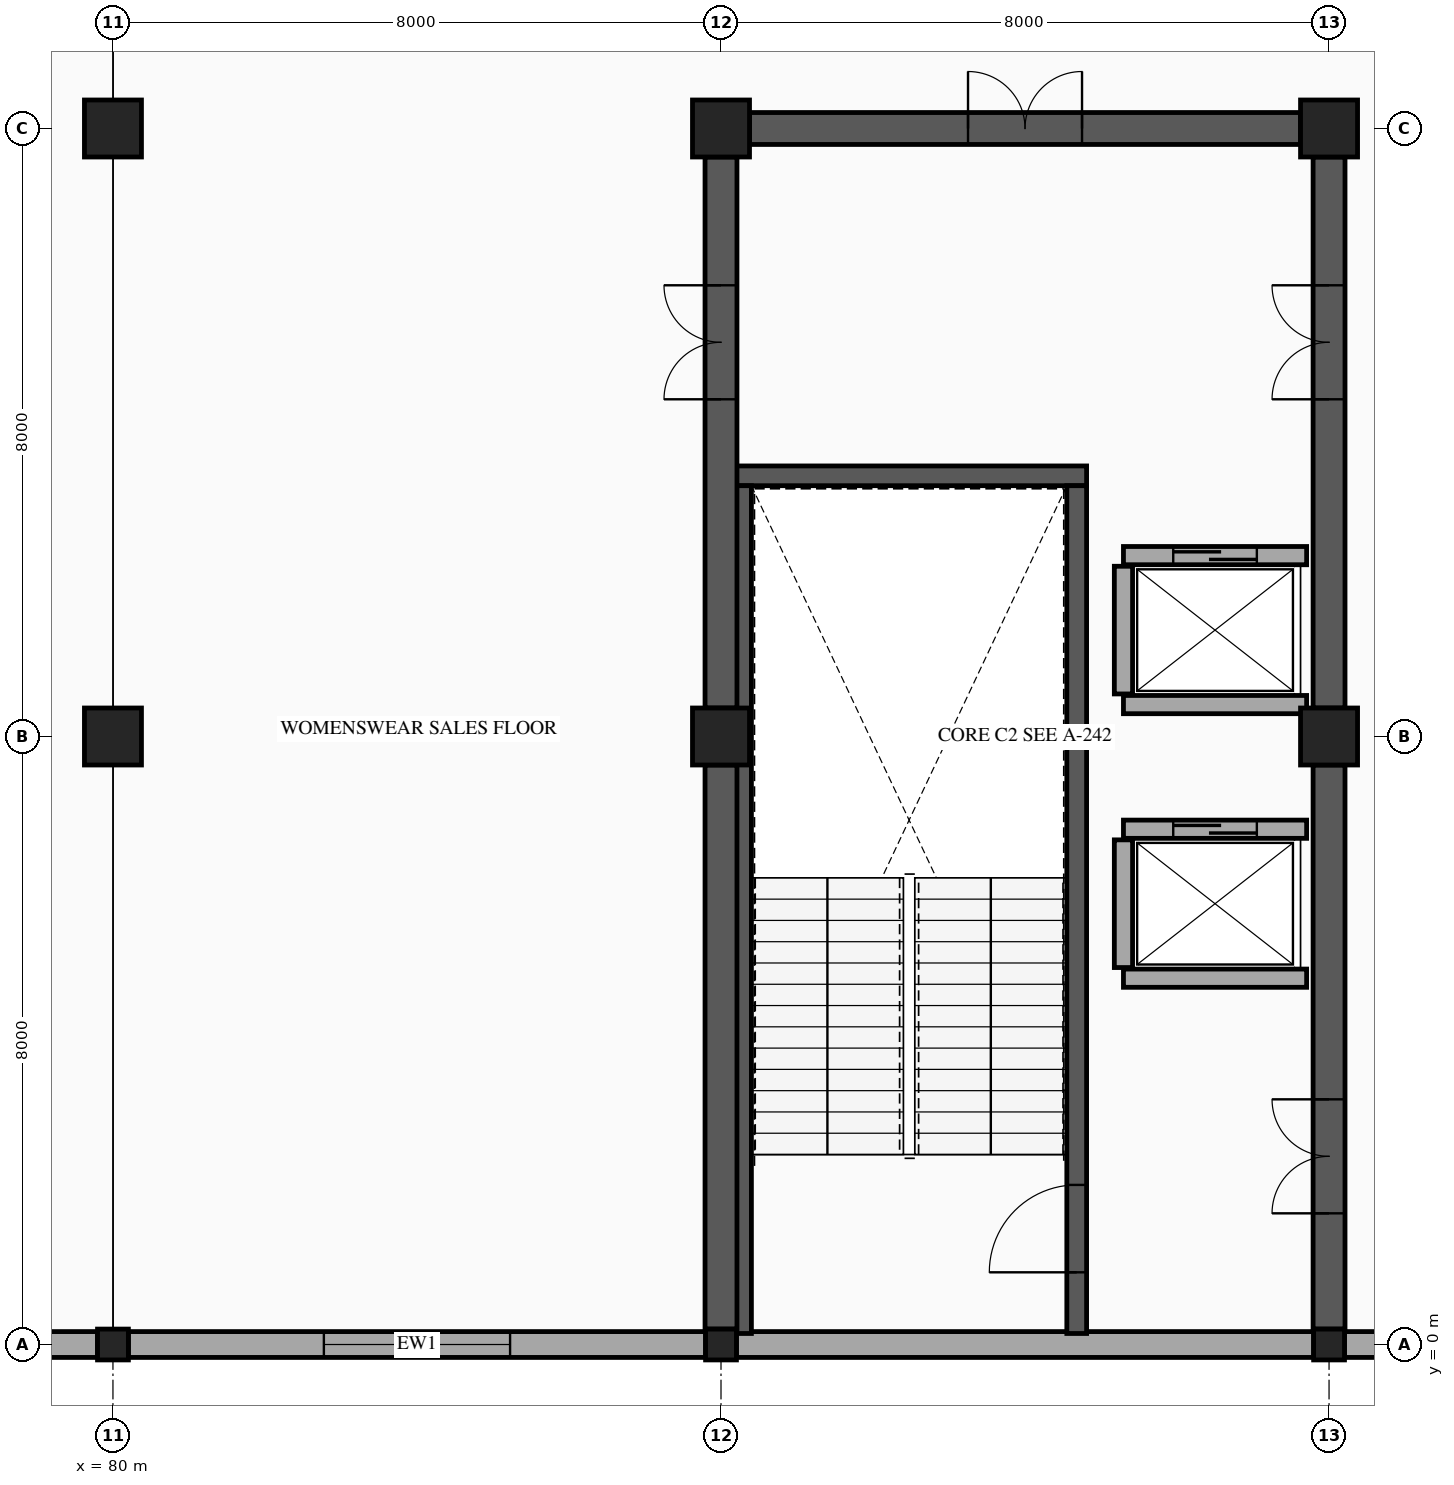
"""IFC4 building model, lengths in metres.
Left out: names, types, materials, properties, quantities, classifications, styles, units other than length and angle.
Written with IfcOpenShell. Run it as: python <this file> out.ifc"""

import sys

from ifc_helpers import new_model, si_unit, direction, frame, frame_2d, origin, origin_2d, place, context, subcontext, project, spatial, rectangle, hollow_rectangle, extrude, element, fill, save


model = new_model("IFC4")
c1 = context("Model", 3, precision=1e-05, world=origin(), true_north=direction((0.0, 1.0)))
c2 = subcontext(c1, "Body", "Model", "MODEL_VIEW")
j1 = project(units=[si_unit("LENGTHUNIT", "METRE"), si_unit("PLANEANGLEUNIT", "RADIAN")], contexts=[c1])
p1 = place(None, origin())
s1 = spatial("IfcSite", under=j1, at=p1, CompositionType="ELEMENT")
p2 = place(p1, origin())
s2 = spatial("IfcBuilding", under=s1, at=p2, CompositionType="ELEMENT")
p3 = place(p2, frame((0.0, 0.0, 5.6)))
s3 = spatial("IfcBuildingStorey", under=s2, at=p3, CompositionType="ELEMENT", Elevation=5.6)
p4 = place(p3, frame((80.0, 0.0, 0.0), z_axis=(0.0, 0.0, 1.0), x_axis=(1.0, 0.0, 0.0)))
e1 = element("IfcColumn", 1, at=p4, inside=s3, PredefinedType="COLUMN", context=c2, shape_type="SweptSolid", body=[
    extrude(hollow_rectangle(XDim=0.406, YDim=0.406, WallThickness=0.015, InnerFilletRadius=0.015, OuterFilletRadius=0.029, at=origin_2d()), origin(), (0.0, 0.0, 1.0), 4.8),
])
for number, where, z_axis, x_axis in (
    (2, (80.0, 8.0, 0.0), (0.0, 0.0, 1.0), (1.0, 0.0, 0.0)),
    (3, (80.0, 16.0, 0.0), (0.0, 0.0, 1.0), (1.0, 0.0, 0.0)),
):
    element("IfcColumn", number, at=place(p3, frame(where, z_axis=z_axis, x_axis=x_axis)), inside=s3, PredefinedType="COLUMN", context=c2, shape_type="SweptSolid", body=[
        extrude(rectangle(XDim=0.75, YDim=0.75, at=origin_2d()), origin(), (0.0, 0.0, 1.0), 4.8),
    ])
p5 = place(p3, frame((88.0, 0.0, 0.0), z_axis=(0.0, 0.0, 1.0), x_axis=(1.0, 0.0, 0.0)))
e4 = element("IfcColumn", 4, at=p5, inside=s3, PredefinedType="COLUMN", context=c2, shape_type="SweptSolid", body=[
    extrude(hollow_rectangle(XDim=0.406, YDim=0.406, WallThickness=0.015, InnerFilletRadius=0.015, OuterFilletRadius=0.029, at=origin_2d()), origin(), (0.0, 0.0, 1.0), 4.8),
])
for number, where, z_axis, x_axis in (
    (5, (88.0, 8.0, 0.0), (0.0, 0.0, 1.0), (1.0, 0.0, 0.0)),
    (6, (88.0, 16.0, 0.0), (0.0, 0.0, 1.0), (1.0, 0.0, 0.0)),
):
    element("IfcColumn", number, at=place(p3, frame(where, z_axis=z_axis, x_axis=x_axis)), inside=s3, PredefinedType="COLUMN", context=c2, shape_type="SweptSolid", body=[
        extrude(rectangle(XDim=0.75, YDim=0.75, at=origin_2d()), origin(), (0.0, 0.0, 1.0), 4.8),
    ])
p6 = place(p3, frame((96.0, 0.0, 0.0), z_axis=(0.0, 0.0, 1.0), x_axis=(1.0, 0.0, 0.0)))
e7 = element("IfcColumn", 7, at=p6, inside=s3, PredefinedType="COLUMN", context=c2, shape_type="SweptSolid", body=[
    extrude(hollow_rectangle(XDim=0.406, YDim=0.406, WallThickness=0.015, InnerFilletRadius=0.015, OuterFilletRadius=0.029, at=origin_2d()), origin(), (0.0, 0.0, 1.0), 4.8),
])
for number, where, z_axis, x_axis in (
    (8, (96.0, 8.0, 0.0), (0.0, 0.0, 1.0), (1.0, 0.0, 0.0)),
    (9, (96.0, 16.0, 0.0), (0.0, 0.0, 1.0), (1.0, 0.0, 0.0)),
):
    element("IfcColumn", number, at=place(p3, frame(where, z_axis=z_axis, x_axis=x_axis)), inside=s3, PredefinedType="COLUMN", context=c2, shape_type="SweptSolid", body=[
        extrude(rectangle(XDim=0.75, YDim=0.75, at=origin_2d()), origin(), (0.0, 0.0, 1.0), 4.8),
    ])
p7 = place(p3, frame((103.797, 0.0, 0.0), z_axis=(0.0, 0.0, 1.0), x_axis=(-1.0, 0.0, 0.0)))
e10 = element("IfcWall", 10, at=p7, inside=s3, PredefinedType="STANDARD", context=c2, shape_type="SweptSolid", body=[
    extrude(rectangle(XDim=7.594, YDim=0.34, at=frame_2d((3.797, 0.0))), origin(), (0.0, 0.0, 1.0), 3.78),
])
p8 = place(p7, frame((2.572, 0.0, 0.8)))
e11 = element("IfcOpeningElement", 11, at=p8, cuts=e10, PredefinedType="OPENING", context=c2, shape_type="SweptSolid", body=[
    extrude(rectangle(XDim=2.45, YDim=1.85, at=frame_2d((1.225, 0.925))), frame((0.0, 0.18, 0.0), z_axis=(0.0, -1.0, 0.0), x_axis=(1.0, 0.0, 0.0)), (0.0, 0.0, 1.0), 0.36),
])
p9 = place(p3, frame((95.797, 0.0, 0.0), z_axis=(0.0, 0.0, 1.0), x_axis=(-1.0, 0.0, 0.0)))
e12 = element("IfcWall", 12, at=p9, inside=s3, PredefinedType="STANDARD", context=c2, shape_type="SweptSolid", body=[
    extrude(rectangle(XDim=7.594, YDim=0.34, at=frame_2d((3.797, 0.0))), origin(), (0.0, 0.0, 1.0), 3.78),
])
p10 = place(p3, frame((87.797, 0.0, 0.0), z_axis=(0.0, 0.0, 1.0), x_axis=(-1.0, 0.0, 0.0)))
e13 = element("IfcWall", 13, at=p10, inside=s3, PredefinedType="STANDARD", context=c2, shape_type="SweptSolid", body=[
    extrude(rectangle(XDim=7.594, YDim=0.34, at=frame_2d((3.797, 0.0))), origin(), (0.0, 0.0, 1.0), 3.78),
])
p11 = place(p10, frame((2.572, 0.0, 0.8)))
e14 = element("IfcOpeningElement", 14, at=p11, cuts=e13, PredefinedType="OPENING", context=c2, shape_type="SweptSolid", body=[
    extrude(rectangle(XDim=2.45, YDim=1.85, at=frame_2d((1.225, 0.925))), frame((0.0, 0.18, 0.0), z_axis=(0.0, -1.0, 0.0), x_axis=(1.0, 0.0, 0.0)), (0.0, 0.0, 1.0), 0.36),
])
p12 = place(p3, frame((79.797, 0.0, 0.0), z_axis=(0.0, 0.0, 1.0), x_axis=(-1.0, 0.0, 0.0)))
e15 = element("IfcWall", 15, at=p12, inside=s3, PredefinedType="STANDARD", context=c2, shape_type="SweptSolid", body=[
    extrude(rectangle(XDim=7.645, YDim=0.34, at=frame_2d((3.822, 0.0))), origin(), (0.0, 0.0, 1.0), 3.78),
])
p13 = place(p12, frame((2.872, 0.0, 0.8)))
e16 = element("IfcOpeningElement", 16, at=p13, cuts=e15, PredefinedType="OPENING", context=c2, shape_type="SweptSolid", body=[
    extrude(rectangle(XDim=1.9, YDim=1.65, at=frame_2d((0.95, 0.825))), frame((0.0, 0.18, 0.0), z_axis=(0.0, -1.0, 0.0), x_axis=(1.0, 0.0, 0.0)), (0.0, 0.0, 1.0), 0.36),
])
p14 = place(p3, frame((88.14, 11.43, 0.0), z_axis=(0.0, 0.0, 1.0), x_axis=(1.0, 0.0, 0.0)))
e17 = element("IfcWall", 17, at=p14, inside=s3, PredefinedType="SHEAR", context=c2, shape_type="SweptSolid", body=[
    extrude(rectangle(XDim=4.67, YDim=0.26, at=frame_2d((2.335, 0.0))), origin(), (0.0, 0.0, 1.0), 4.58),
])
p15 = place(p3, frame((88.27, 0.145, 0.0), z_axis=(0.0, 0.0, 1.0), x_axis=(0.0, 1.0, 0.0)))
e18 = element("IfcWall", 18, at=p15, inside=s3, PredefinedType="SHEAR", context=c2, shape_type="SweptSolid", body=[
    extrude(rectangle(XDim=11.155, YDim=0.26, at=frame_2d((5.578, 0.0))), origin(), (0.0, 0.0, 1.0), 4.58),
])
p16 = place(p3, frame((92.68, 0.145, 0.0), z_axis=(0.0, 0.0, 1.0), x_axis=(0.0, 1.0, 0.0)))
e19 = element("IfcWall", 19, at=p16, inside=s3, PredefinedType="SHEAR", context=c2, shape_type="SweptSolid", body=[
    extrude(rectangle(XDim=11.155, YDim=0.26, at=frame_2d((5.578, 0.0))), origin(), (0.0, 0.0, 1.0), 4.58),
])
p17 = place(p16, frame((0.805, 0.0, 0.0)))
e20 = element("IfcOpeningElement", 20, at=p17, cuts=e19, PredefinedType="OPENING", context=c2, shape_type="SweptSolid", body=[
    extrude(rectangle(XDim=1.15, YDim=2.15, at=frame_2d((0.575, 1.075))), frame((0.0, 0.14, 0.0), z_axis=(0.0, -1.0, 0.0), x_axis=(1.0, 0.0, 0.0)), (0.0, 0.0, 1.0), 0.28),
])
p18 = place(p3, frame((88.375, 16.0, 0.0), z_axis=(0.0, 0.0, 1.0), x_axis=(1.0, 0.0, 0.0)))
e21 = element("IfcWall", 21, at=p18, inside=s3, PredefinedType="SHEAR", context=c2, shape_type="SweptSolid", body=[
    extrude(rectangle(XDim=7.25, YDim=0.42, at=frame_2d((3.625, 0.0))), origin(), (0.0, 0.0, 1.0), 4.58),
])
p19 = place(p18, frame((2.875, 0.0, 0.0)))
e22 = element("IfcOpeningElement", 22, at=p19, cuts=e21, PredefinedType="OPENING", context=c2, shape_type="SweptSolid", body=[
    extrude(rectangle(XDim=1.5, YDim=2.15, at=frame_2d((0.75, 1.075))), frame((0.0, 0.22, 0.0), z_axis=(0.0, -1.0, 0.0), x_axis=(1.0, 0.0, 0.0)), (0.0, 0.0, 1.0), 0.44),
])
p20 = place(p3, frame((88.0, 0.203, 0.0), z_axis=(0.0, 0.0, 1.0), x_axis=(0.0, 1.0, 0.0)))
e23 = element("IfcWall", 23, at=p20, inside=s3, PredefinedType="SHEAR", context=c2, shape_type="SweptSolid", body=[
    extrude(rectangle(XDim=7.422, YDim=0.42, at=frame_2d((3.711, 0.0))), origin(), (0.0, 0.0, 1.0), 4.58),
])
p21 = place(p3, frame((88.0, 8.375, 0.0), z_axis=(0.0, 0.0, 1.0), x_axis=(0.0, 1.0, 0.0)))
e24 = element("IfcWall", 24, at=p21, inside=s3, PredefinedType="SHEAR", context=c2, shape_type="SweptSolid", body=[
    extrude(rectangle(XDim=7.25, YDim=0.42, at=frame_2d((3.625, 0.0))), origin(), (0.0, 0.0, 1.0), 4.58),
])
p22 = place(p21, frame((4.062, 0.0, 0.0)))
e25 = element("IfcOpeningElement", 25, at=p22, cuts=e24, PredefinedType="OPENING", context=c2, shape_type="SweptSolid", body=[
    extrude(rectangle(XDim=1.5, YDim=2.15, at=frame_2d((0.75, 1.075))), frame((0.0, 0.22, 0.0), z_axis=(0.0, -1.0, 0.0), x_axis=(1.0, 0.0, 0.0)), (0.0, 0.0, 1.0), 0.44),
])
p23 = place(p3, frame((96.0, 0.203, 0.0), z_axis=(0.0, 0.0, 1.0), x_axis=(0.0, 1.0, 0.0)))
e26 = element("IfcWall", 26, at=p23, inside=s3, PredefinedType="SHEAR", context=c2, shape_type="SweptSolid", body=[
    extrude(rectangle(XDim=7.422, YDim=0.42, at=frame_2d((3.711, 0.0))), origin(), (0.0, 0.0, 1.0), 4.58),
])
p24 = place(p23, frame((1.523, 0.0, 0.0)))
e27 = element("IfcOpeningElement", 27, at=p24, cuts=e26, PredefinedType="OPENING", context=c2, shape_type="SweptSolid", body=[
    extrude(rectangle(XDim=1.5, YDim=2.15, at=frame_2d((0.75, 1.075))), frame((0.0, 0.22, 0.0), z_axis=(0.0, -1.0, 0.0), x_axis=(1.0, 0.0, 0.0)), (0.0, 0.0, 1.0), 0.44),
])
p25 = place(p3, frame((96.0, 8.375, 0.0), z_axis=(0.0, 0.0, 1.0), x_axis=(0.0, 1.0, 0.0)))
e28 = element("IfcWall", 28, at=p25, inside=s3, PredefinedType="SHEAR", context=c2, shape_type="SweptSolid", body=[
    extrude(rectangle(XDim=7.25, YDim=0.42, at=frame_2d((3.625, 0.0))), origin(), (0.0, 0.0, 1.0), 4.58),
])
p26 = place(p25, frame((4.062, 0.0, 0.0)))
e29 = element("IfcOpeningElement", 29, at=p26, cuts=e28, PredefinedType="OPENING", context=c2, shape_type="SweptSolid", body=[
    extrude(rectangle(XDim=1.5, YDim=2.15, at=frame_2d((0.75, 1.075))), frame((0.0, 0.22, 0.0), z_axis=(0.0, -1.0, 0.0), x_axis=(1.0, 0.0, 0.0)), (0.0, 0.0, 1.0), 0.44),
])
p27 = place(p3, frame((93.295, 6.78, 0.0), z_axis=(0.0, 0.0, 1.0), x_axis=(1.0, 0.0, 0.0)))
e30 = element("IfcWall", 30, at=p27, inside=s3, PredefinedType="PARTITIONING", context=c2, shape_type="SweptSolid", body=[
    extrude(rectangle(XDim=2.41, YDim=0.24, at=frame_2d((1.205, 0.0))), origin(), (0.0, 0.0, 1.0), 4.58),
])
p28 = place(p27, frame((0.655, 0.0, 0.0)))
e31 = element("IfcOpeningElement", 31, at=p28, cuts=e30, PredefinedType="OPENING", context=c2, shape_type="SweptSolid", body=[
    extrude(rectangle(XDim=1.1, YDim=2.15, at=frame_2d((0.55, 1.075))), frame((0.0, 0.13, 0.0), z_axis=(0.0, -1.0, 0.0), x_axis=(1.0, 0.0, 0.0)), (0.0, 0.0, 1.0), 0.26),
])
p29 = place(p3, frame((93.295, 4.82, 0.0), z_axis=(0.0, 0.0, 1.0), x_axis=(1.0, 0.0, 0.0)))
e32 = element("IfcWall", 32, at=p29, inside=s3, PredefinedType="PARTITIONING", context=c2, shape_type="SweptSolid", body=[
    extrude(rectangle(XDim=2.41, YDim=0.24, at=frame_2d((1.205, 0.0))), origin(), (0.0, 0.0, 1.0), 4.58),
])
p30 = place(p3, frame((93.295, 4.96, 0.0), z_axis=(0.0, 0.0, 1.0), x_axis=(0.0, 1.0, 0.0)))
e33 = element("IfcWall", 33, at=p30, inside=s3, PredefinedType="PARTITIONING", context=c2, shape_type="SweptSolid", body=[
    extrude(rectangle(XDim=1.68, YDim=0.24, at=frame_2d((0.84, 0.0))), origin(), (0.0, 0.0, 1.0), 4.58),
])
p31 = place(p3, frame((93.295, 10.38, 0.0), z_axis=(0.0, 0.0, 1.0), x_axis=(1.0, 0.0, 0.0)))
e34 = element("IfcWall", 34, at=p31, inside=s3, PredefinedType="PARTITIONING", context=c2, shape_type="SweptSolid", body=[
    extrude(rectangle(XDim=2.41, YDim=0.24, at=frame_2d((1.205, 0.0))), origin(), (0.0, 0.0, 1.0), 4.58),
])
p32 = place(p31, frame((0.655, 0.0, 0.0)))
e35 = element("IfcOpeningElement", 35, at=p32, cuts=e34, PredefinedType="OPENING", context=c2, shape_type="SweptSolid", body=[
    extrude(rectangle(XDim=1.1, YDim=2.15, at=frame_2d((0.55, 1.075))), frame((0.0, 0.13, 0.0), z_axis=(0.0, -1.0, 0.0), x_axis=(1.0, 0.0, 0.0)), (0.0, 0.0, 1.0), 0.26),
])
p33 = place(p3, frame((93.295, 8.42, 0.0), z_axis=(0.0, 0.0, 1.0), x_axis=(1.0, 0.0, 0.0)))
e36 = element("IfcWall", 36, at=p33, inside=s3, PredefinedType="PARTITIONING", context=c2, shape_type="SweptSolid", body=[
    extrude(rectangle(XDim=2.41, YDim=0.24, at=frame_2d((1.205, 0.0))), origin(), (0.0, 0.0, 1.0), 4.58),
])
p34 = place(p3, frame((93.295, 8.56, 0.0), z_axis=(0.0, 0.0, 1.0), x_axis=(0.0, 1.0, 0.0)))
e37 = element("IfcWall", 37, at=p34, inside=s3, PredefinedType="PARTITIONING", context=c2, shape_type="SweptSolid", body=[
    extrude(rectangle(XDim=1.68, YDim=0.24, at=frame_2d((0.84, 0.0))), origin(), (0.0, 0.0, 1.0), 4.58),
])
p35 = place(p11, origin())
e38 = element("IfcWindow", 38, at=p35, inside=s3, PartitioningType="DOUBLE_PANEL_VERTICAL", PredefinedType="WINDOW", context=c2, shape_type="SweptSolid", body=[
    extrude(rectangle(XDim=2.45, YDim=1.85, at=frame_2d((1.225, 0.925))), frame((0.0, 0.03, 0.0), z_axis=(0.0, -1.0, 0.0), x_axis=(1.0, 0.0, 0.0)), (0.0, 0.0, 1.0), 0.06),
])
fill(e14, e38)
p36 = place(p17, origin())
e39 = element("IfcDoor", 39, at=p36, inside=s3, OperationType="SINGLE_SWING_LEFT", PredefinedType="DOOR", context=c2, shape_type="SweptSolid", body=[
    extrude(rectangle(XDim=1.15, YDim=2.15, at=frame_2d((0.575, 1.075))), frame((0.0, 0.025, 0.0), z_axis=(0.0, -1.0, 0.0), x_axis=(1.0, 0.0, 0.0)), (0.0, 0.0, 1.0), 0.05),
])
fill(e20, e39)
p37 = place(p19, origin())
e40 = element("IfcDoor", 40, at=p37, inside=s3, OperationType="DOUBLE_DOOR_SINGLE_SWING", PredefinedType="DOOR", context=c2, shape_type="SweptSolid", body=[
    extrude(rectangle(XDim=1.5, YDim=2.15, at=frame_2d((0.75, 1.075))), frame((0.0, 0.025, 0.0), z_axis=(0.0, -1.0, 0.0), x_axis=(1.0, 0.0, 0.0)), (0.0, 0.0, 1.0), 0.05),
])
fill(e22, e40)
p38 = place(p22, origin())
e41 = element("IfcDoor", 41, at=p38, inside=s3, OperationType="DOUBLE_DOOR_SINGLE_SWING", PredefinedType="DOOR", context=c2, shape_type="SweptSolid", body=[
    extrude(rectangle(XDim=1.5, YDim=2.15, at=frame_2d((0.75, 1.075))), frame((0.0, 0.025, 0.0), z_axis=(0.0, -1.0, 0.0), x_axis=(1.0, 0.0, 0.0)), (0.0, 0.0, 1.0), 0.05),
])
fill(e25, e41)
p39 = place(p24, origin())
e42 = element("IfcDoor", 42, at=p39, inside=s3, OperationType="DOUBLE_DOOR_SINGLE_SWING", PredefinedType="DOOR", context=c2, shape_type="SweptSolid", body=[
    extrude(rectangle(XDim=1.5, YDim=2.15, at=frame_2d((0.75, 1.075))), frame((0.0, 0.025, 0.0), z_axis=(0.0, -1.0, 0.0), x_axis=(1.0, 0.0, 0.0)), (0.0, 0.0, 1.0), 0.05),
])
fill(e27, e42)
p40 = place(p26, origin())
e43 = element("IfcDoor", 43, at=p40, inside=s3, OperationType="DOUBLE_DOOR_SINGLE_SWING", PredefinedType="DOOR", context=c2, shape_type="SweptSolid", body=[
    extrude(rectangle(XDim=1.5, YDim=2.15, at=frame_2d((0.75, 1.075))), frame((0.0, 0.025, 0.0), z_axis=(0.0, -1.0, 0.0), x_axis=(1.0, 0.0, 0.0)), (0.0, 0.0, 1.0), 0.05),
])
fill(e29, e43)
p41 = place(p28, origin())
e44 = element("IfcDoor", 44, at=p41, inside=s3, OperationType="SLIDING_TO_LEFT", PredefinedType="DOOR", context=c2, shape_type="SweptSolid", body=[
    extrude(rectangle(XDim=1.1, YDim=2.15, at=frame_2d((0.55, 1.075))), frame((0.0, 0.025, 0.0), z_axis=(0.0, -1.0, 0.0), x_axis=(1.0, 0.0, 0.0)), (0.0, 0.0, 1.0), 0.05),
])
fill(e31, e44)
p42 = place(p32, origin())
e45 = element("IfcDoor", 45, at=p42, inside=s3, OperationType="SLIDING_TO_LEFT", PredefinedType="DOOR", context=c2, shape_type="SweptSolid", body=[
    extrude(rectangle(XDim=1.1, YDim=2.15, at=frame_2d((0.55, 1.075))), frame((0.0, 0.025, 0.0), z_axis=(0.0, -1.0, 0.0), x_axis=(1.0, 0.0, 0.0)), (0.0, 0.0, 1.0), 0.05),
])
fill(e35, e45)
save(model, sys.argv[1])
